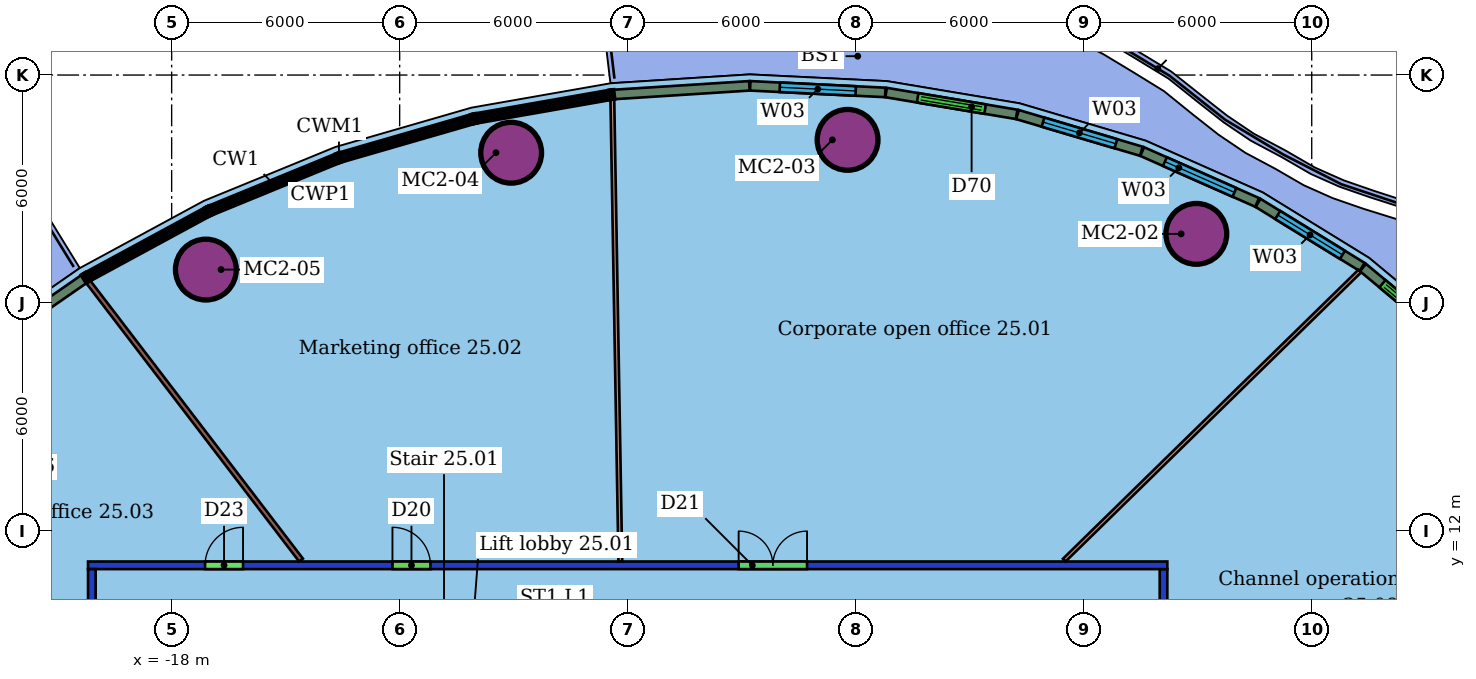
"""IFC4 building model, lengths in metres.
Left out: names, types, materials, properties, quantities, classifications, styles, units other than length and angle.
Written with IfcOpenShell. Run it as: python <this file> out.ifc"""

import sys

from ifc_helpers import new_model, si_unit, direction, frame, frame_2d, origin, origin_2d, place, context, subcontext, project, spatial, rectangle, hollow_circle, extrude, element, fill, save


model = new_model("IFC4")
c1 = context("Model", 3, precision=1e-05, world=origin(), true_north=direction((0.0, 1.0)))
c2 = subcontext(c1, "Body", "Model", "MODEL_VIEW")
j1 = project(units=[si_unit("LENGTHUNIT", "METRE"), si_unit("PLANEANGLEUNIT", "RADIAN")], contexts=[c1])
p1 = place(None, origin())
s1 = spatial("IfcSite", under=j1, at=p1, CompositionType="ELEMENT")
p2 = place(p1, origin())
s2 = spatial("IfcBuilding", under=s1, at=p2, CompositionType="ELEMENT")
p3 = place(p2, frame((0.0, 0.0, 110.2)))
s3 = spatial("IfcBuildingStorey", under=s2, at=p3, CompositionType="ELEMENT", Elevation=110.2)
for number, where, z_axis, x_axis in (
    (1, (8.963, 19.821, 0.0), (0.0, 0.0, 1.0), (1.0, 0.0, 0.0)),
    (2, (-0.213, 22.294, 0.0), (0.0, 0.0, 1.0), (1.0, 0.0, 0.0)),
    (3, (-9.066, 21.956, 0.0), (0.0, 0.0, 1.0), (1.0, 0.0, 0.0)),
    (4, (-17.1, 18.881, 0.0), (0.0, 0.0, 1.0), (1.0, 0.0, 0.0)),
):
    element("IfcColumn", number, at=place(p3, frame(where, z_axis=z_axis, x_axis=x_axis)), inside=s3, PredefinedType="COLUMN", context=c2, shape_type="SweptSolid", body=[
        extrude(hollow_circle(Radius=0.8, WallThickness=0.055, at=origin_2d()), origin(), (0.0, 0.0, 1.0), 3.45),
    ])
p4 = place(p3, frame((-20.1, -11.0, 0.0), z_axis=(0.0, 0.0, 1.0), x_axis=(0.0, 1.0, 0.0)))
e5 = element("IfcWall", 5, at=p4, inside=s3, PredefinedType="PARTITIONING", context=c2, shape_type="SweptSolid", body=[
    extrude(rectangle(XDim=22.0, YDim=0.2, at=frame_2d((11.0, 0.0))), origin(), (0.0, 0.0, 1.0), 3.0),
])
p5 = place(p4, frame((9.381, 0.0, 0.0)))
e6 = element("IfcOpeningElement", 6, at=p5, cuts=e5, PredefinedType="OPENING", context=c2, shape_type="SweptSolid", body=[
    extrude(rectangle(XDim=1.8, YDim=2.1, at=frame_2d((0.9, 1.05))), frame((0.0, 0.11, 0.0), z_axis=(0.0, -1.0, 0.0), x_axis=(1.0, 0.0, 0.0)), (0.0, 0.0, 1.0), 0.22),
])
p6 = place(p3, frame((-20.2, 11.1, 0.0), z_axis=(0.0, 0.0, 1.0), x_axis=(1.0, 0.0, 0.0)))
e7 = element("IfcWall", 7, at=p6, inside=s3, PredefinedType="PARTITIONING", context=c2, shape_type="SweptSolid", body=[
    extrude(rectangle(XDim=28.4, YDim=0.2, at=frame_2d((14.2, 0.0))), origin(), (0.0, 0.0, 1.0), 3.0),
])
p7 = place(p6, frame((17.12, 0.0, 0.0)))
e8 = element("IfcOpeningElement", 8, at=p7, cuts=e7, PredefinedType="OPENING", context=c2, shape_type="SweptSolid", body=[
    extrude(rectangle(XDim=1.8, YDim=2.1, at=frame_2d((0.9, 1.05))), frame((0.0, 0.11, 0.0), z_axis=(0.0, -1.0, 0.0), x_axis=(1.0, 0.0, 0.0)), (0.0, 0.0, 1.0), 0.22),
])
p8 = place(p6, frame((8.01, 0.0, 0.0)))
e9 = element("IfcOpeningElement", 9, at=p8, cuts=e7, PredefinedType="OPENING", context=c2, shape_type="SweptSolid", body=[
    extrude(rectangle(XDim=1.0, YDim=2.1, at=frame_2d((0.5, 1.05))), frame((0.0, 0.11, 0.0), z_axis=(0.0, -1.0, 0.0), x_axis=(1.0, 0.0, 0.0)), (0.0, 0.0, 1.0), 0.22),
])
p9 = place(p6, frame((3.078, 0.0, 0.0)))
e10 = element("IfcOpeningElement", 10, at=p9, cuts=e7, PredefinedType="OPENING", context=c2, shape_type="SweptSolid", body=[
    extrude(rectangle(XDim=1.0, YDim=2.4, at=frame_2d((0.5, 1.2))), frame((0.0, 0.11, 0.0), z_axis=(0.0, -1.0, 0.0), x_axis=(1.0, 0.0, 0.0)), (0.0, 0.0, 1.0), 0.22),
])
p10 = place(p3, frame((8.1, 11.0, 0.0), z_axis=(0.0, 0.0, 1.0), x_axis=(0.0, -1.0, 0.0)))
e11 = element("IfcWall", 11, at=p10, inside=s3, PredefinedType="PARTITIONING", context=c2, shape_type="SweptSolid", body=[
    extrude(rectangle(XDim=22.0, YDim=0.2, at=frame_2d((11.0, 0.0))), origin(), (0.0, 0.0, 1.0), 3.0),
])
p11 = place(p10, frame((10.526, 0.0, 0.0)))
e12 = element("IfcOpeningElement", 12, at=p11, cuts=e11, PredefinedType="OPENING", context=c2, shape_type="SweptSolid", body=[
    extrude(rectangle(XDim=1.8, YDim=2.1, at=frame_2d((0.9, 1.05))), frame((0.0, 0.11, 0.0), z_axis=(0.0, -1.0, 0.0), x_axis=(1.0, 0.0, 0.0)), (0.0, 0.0, 1.0), 0.22),
])
p12 = place(p10, frame((3.909, 0.0, 0.0)))
e13 = element("IfcOpeningElement", 13, at=p12, cuts=e11, PredefinedType="OPENING", context=c2, shape_type="SweptSolid", body=[
    extrude(rectangle(XDim=1.8, YDim=2.1, at=frame_2d((0.9, 1.05))), frame((0.0, 0.11, 0.0), z_axis=(0.0, -1.0, 0.0), x_axis=(1.0, 0.0, 0.0)), (0.0, 0.0, 1.0), 0.22),
])
p13 = place(p3, frame((13.265, 18.842, 0.0), z_axis=(0.0, 0.0, 1.0), x_axis=(-0.714906942323, -0.699219610579, 0.0)))
e14 = element("IfcWall", 14, at=p13, inside=s3, PredefinedType="PARTITIONING", context=c2, shape_type="SweptSolid", body=[
    extrude(rectangle(XDim=10.878, YDim=0.1, at=frame_2d((5.439, 0.0))), origin(), (0.0, 0.0, 1.0), 3.45),
])
p14 = place(p3, frame((-6.403, 23.361, 0.0), z_axis=(0.0, 0.0, 1.0), x_axis=(0.017264075927, -0.999850964735, 0.0)))
e15 = element("IfcWall", 15, at=p14, inside=s3, PredefinedType="PARTITIONING", context=c2, shape_type="SweptSolid", body=[
    extrude(rectangle(XDim=12.162, YDim=0.1, at=frame_2d((6.081, 0.0))), origin(), (0.0, 0.0, 1.0), 3.45),
])
p15 = place(p3, frame((-20.195, 18.558, 0.0), z_axis=(0.0, 0.0, 1.0), x_axis=(0.607534665721, -0.79429316373, 0.0)))
e16 = element("IfcWall", 16, at=p15, inside=s3, PredefinedType="PARTITIONING", context=c2, shape_type="SweptSolid", body=[
    extrude(rectangle(XDim=9.216, YDim=0.125, at=frame_2d((4.608, 0.0))), origin(), (0.0, 0.0, 1.0), 3.45),
])
p16 = place(p3, frame((-28.197, 11.553, 0.0), z_axis=(0.0, 0.0, 1.0), x_axis=(0.887035614959, -0.461701004759, 0.0)))
e17 = element("IfcWall", 17, at=p16, inside=s3, PredefinedType="PARTITIONING", context=c2, shape_type="SweptSolid", body=[
    extrude(rectangle(XDim=8.982, YDim=0.125, at=frame_2d((4.491, 0.0))), origin(), (0.0, 0.0, 1.0), 3.45),
])
p17 = place(p3, frame((15.758, 16.93, 0.0), z_axis=(0.0, 0.0, 1.0), x_axis=(-0.768712564722, 0.639594397129, 0.0)))
e18 = element("IfcWall", 18, at=p17, inside=s3, PredefinedType="SOLIDWALL", context=c2, shape_type="SweptSolid", body=[
    extrude(rectangle(XDim=3.135, YDim=0.25, at=frame_2d((1.567, 0.0))), origin(), (0.0, 0.0, 1.0), 3.05),
])
p18 = place(p17, frame((0.667, 0.0, 0.0)))
e19 = element("IfcOpeningElement", 19, at=p18, cuts=e18, PredefinedType="OPENING", context=c2, shape_type="SweptSolid", body=[
    extrude(rectangle(XDim=1.8, YDim=2.4, at=frame_2d((0.9, 1.2))), frame((0.0, 0.135, 0.0), z_axis=(0.0, -1.0, 0.0), x_axis=(1.0, 0.0, 0.0)), (0.0, 0.0, 1.0), 0.27),
])
p19 = place(p3, frame((13.327, 18.951, 0.0), z_axis=(0.0, 0.0, 1.0), x_axis=(-0.851681761788, 0.524059325494, 0.0)))
e20 = element("IfcWall", 20, at=p19, inside=s3, PredefinedType="SOLIDWALL", context=c2, shape_type="SweptSolid", body=[
    extrude(rectangle(XDim=3.218, YDim=0.25, at=frame_2d((1.609, 0.0))), origin(), (0.0, 0.0, 1.0), 3.05),
])
p20 = place(p19, frame((0.609, 0.0, 0.9)))
e21 = element("IfcOpeningElement", 21, at=p20, cuts=e20, PredefinedType="OPENING", context=c2, shape_type="SweptSolid", body=[
    extrude(rectangle(XDim=2.0, YDim=2.1, at=frame_2d((1.0, 1.05))), frame((0.0, 0.135, 0.0), z_axis=(0.0, -1.0, 0.0), x_axis=(1.0, 0.0, 0.0)), (0.0, 0.0, 1.0), 0.27),
])
p21 = place(p3, frame((10.564, 20.648, 0.0), z_axis=(0.0, 0.0, 1.0), x_axis=(-0.91455266452, 0.404466838961, 0.0)))
e22 = element("IfcWall", 22, at=p21, inside=s3, PredefinedType="SOLIDWALL", context=c2, shape_type="SweptSolid", body=[
    extrude(rectangle(XDim=3.308, YDim=0.25, at=frame_2d((1.654, 0.0))), origin(), (0.0, 0.0, 1.0), 3.05),
])
p22 = place(p21, frame((0.654, 0.0, 0.9)))
e23 = element("IfcOpeningElement", 23, at=p22, cuts=e22, PredefinedType="OPENING", context=c2, shape_type="SweptSolid", body=[
    extrude(rectangle(XDim=2.0, YDim=2.1, at=frame_2d((1.0, 1.05))), frame((0.0, 0.135, 0.0), z_axis=(0.0, -1.0, 0.0), x_axis=(1.0, 0.0, 0.0)), (0.0, 0.0, 1.0), 0.27),
])
p23 = place(p3, frame((7.517, 21.995, 0.0), z_axis=(0.0, 0.0, 1.0), x_axis=(-0.958824925222, 0.283997821775, 0.0)))
e24 = element("IfcWall", 24, at=p23, inside=s3, PredefinedType="SOLIDWALL", context=c2, shape_type="SweptSolid", body=[
    extrude(rectangle(XDim=3.398, YDim=0.25, at=frame_2d((1.699, 0.0))), origin(), (0.0, 0.0, 1.0), 3.05),
])
p24 = place(p23, frame((0.699, 0.0, 0.9)))
e25 = element("IfcOpeningElement", 25, at=p24, cuts=e24, PredefinedType="OPENING", context=c2, shape_type="SweptSolid", body=[
    extrude(rectangle(XDim=2.0, YDim=2.1, at=frame_2d((1.0, 1.05))), frame((0.0, 0.135, 0.0), z_axis=(0.0, -1.0, 0.0), x_axis=(1.0, 0.0, 0.0)), (0.0, 0.0, 1.0), 0.27),
])
p25 = place(p3, frame((4.236, 22.965, 0.0), z_axis=(0.0, 0.0, 1.0), x_axis=(-0.986281925568, 0.165069571083, 0.0)))
e26 = element("IfcWall", 26, at=p25, inside=s3, PredefinedType="SOLIDWALL", context=c2, shape_type="SweptSolid", body=[
    extrude(rectangle(XDim=3.483, YDim=0.25, at=frame_2d((1.742, 0.0))), origin(), (0.0, 0.0, 1.0), 3.05),
])
p26 = place(p25, frame((0.842, 0.0, 0.0)))
e27 = element("IfcOpeningElement", 27, at=p26, cuts=e26, PredefinedType="OPENING", context=c2, shape_type="SweptSolid", body=[
    extrude(rectangle(XDim=1.8, YDim=2.4, at=frame_2d((0.9, 1.2))), frame((0.0, 0.135, 0.0), z_axis=(0.0, -1.0, 0.0), x_axis=(1.0, 0.0, 0.0)), (0.0, 0.0, 1.0), 0.27),
])
p27 = place(p3, frame((0.778, 23.542, 0.0), z_axis=(0.0, 0.0, 1.0), x_axis=(-0.998802311513, 0.048927931852, 0.0)))
e28 = element("IfcWall", 28, at=p27, inside=s3, PredefinedType="SOLIDWALL", context=c2, shape_type="SweptSolid", body=[
    extrude(rectangle(XDim=3.558, YDim=0.25, at=frame_2d((1.779, 0.0))), origin(), (0.0, 0.0, 1.0), 3.05),
])
p28 = place(p27, frame((0.779, 0.0, 0.9)))
e29 = element("IfcOpeningElement", 29, at=p28, cuts=e28, PredefinedType="OPENING", context=c2, shape_type="SweptSolid", body=[
    extrude(rectangle(XDim=2.0, YDim=2.1, at=frame_2d((1.0, 1.05))), frame((0.0, 0.135, 0.0), z_axis=(0.0, -1.0, 0.0), x_axis=(1.0, 0.0, 0.0)), (0.0, 0.0, 1.0), 0.27),
])
p29 = place(p3, frame((-2.797, 23.716, 0.0), z_axis=(0.0, 0.0, 1.0), x_axis=(-0.997966032013, -0.063747932895, 0.0)))
e30 = element("IfcWall", 30, at=p29, inside=s3, PredefinedType="SOLIDWALL", context=c2, shape_type="SweptSolid", body=[
    extrude(rectangle(XDim=3.573, YDim=0.25, at=frame_2d((1.787, 0.0))), origin(), (0.0, 0.0, 1.0), 3.05),
])
p30 = place(p3, frame((-20.305, 18.633, 0.0), z_axis=(0.0, 0.0, 1.0), x_axis=(-0.821702391874, -0.56991681778, 0.0)))
e31 = element("IfcWall", 31, at=p30, inside=s3, PredefinedType="SOLIDWALL", context=c2, shape_type="SweptSolid", body=[
    extrude(rectangle(XDim=3.573, YDim=0.25, at=frame_2d((1.787, 0.0))), origin(), (0.0, 0.0, 1.0), 3.05),
])
p31 = place(p7, origin())
e32 = element("IfcDoor", 32, at=p31, inside=s3, OperationType="DOUBLE_DOOR_SINGLE_SWING", PredefinedType="DOOR", context=c2, shape_type="SweptSolid", body=[
    extrude(rectangle(XDim=1.8, YDim=2.1, at=frame_2d((0.9, 1.05))), frame((0.0, 0.025, 0.0), z_axis=(0.0, -1.0, 0.0), x_axis=(1.0, 0.0, 0.0)), (0.0, 0.0, 1.0), 0.05),
])
fill(e8, e32)
p32 = place(p8, origin())
e33 = element("IfcDoor", 33, at=p32, inside=s3, OperationType="SINGLE_SWING_LEFT", PredefinedType="DOOR", context=c2, shape_type="SweptSolid", body=[
    extrude(rectangle(XDim=1.0, YDim=2.1, at=frame_2d((0.5, 1.05))), frame((0.0, 0.025, 0.0), z_axis=(0.0, -1.0, 0.0), x_axis=(1.0, 0.0, 0.0)), (0.0, 0.0, 1.0), 0.05),
])
fill(e9, e33)
p33 = place(p9, origin())
e34 = element("IfcDoor", 34, at=p33, inside=s3, OperationType="SINGLE_SWING_RIGHT", PredefinedType="DOOR", context=c2, shape_type="SweptSolid", body=[
    extrude(rectangle(XDim=1.0, YDim=2.4, at=frame_2d((0.5, 1.2))), frame((0.0, 0.025, 0.0), z_axis=(0.0, -1.0, 0.0), x_axis=(1.0, 0.0, 0.0)), (0.0, 0.0, 1.0), 0.05),
])
fill(e10, e34)
p34 = place(p18, origin())
e35 = element("IfcDoor", 35, at=p34, inside=s3, OperationType="DOUBLE_DOOR_SLIDING", PredefinedType="DOOR", context=c2, shape_type="SweptSolid", body=[
    extrude(rectangle(XDim=1.8, YDim=2.4, at=frame_2d((0.9, 1.2))), frame((0.0, 0.025, 0.0), z_axis=(0.0, -1.0, 0.0), x_axis=(1.0, 0.0, 0.0)), (0.0, 0.0, 1.0), 0.05),
])
fill(e19, e35)
p35 = place(p20, origin())
e36 = element("IfcWindow", 36, at=p35, inside=s3, PartitioningType="SINGLE_PANEL", PredefinedType="WINDOW", context=c2, shape_type="SweptSolid", body=[
    extrude(rectangle(XDim=2.0, YDim=2.1, at=frame_2d((1.0, 1.05))), frame((0.0, 0.03, 0.0), z_axis=(0.0, -1.0, 0.0), x_axis=(1.0, 0.0, 0.0)), (0.0, 0.0, 1.0), 0.06),
])
fill(e21, e36)
p36 = place(p22, origin())
e37 = element("IfcWindow", 37, at=p36, inside=s3, PartitioningType="SINGLE_PANEL", PredefinedType="WINDOW", context=c2, shape_type="SweptSolid", body=[
    extrude(rectangle(XDim=2.0, YDim=2.1, at=frame_2d((1.0, 1.05))), frame((0.0, 0.03, 0.0), z_axis=(0.0, -1.0, 0.0), x_axis=(1.0, 0.0, 0.0)), (0.0, 0.0, 1.0), 0.06),
])
fill(e23, e37)
p37 = place(p24, origin())
e38 = element("IfcWindow", 38, at=p37, inside=s3, PartitioningType="SINGLE_PANEL", PredefinedType="WINDOW", context=c2, shape_type="SweptSolid", body=[
    extrude(rectangle(XDim=2.0, YDim=2.1, at=frame_2d((1.0, 1.05))), frame((0.0, 0.03, 0.0), z_axis=(0.0, -1.0, 0.0), x_axis=(1.0, 0.0, 0.0)), (0.0, 0.0, 1.0), 0.06),
])
fill(e25, e38)
p38 = place(p26, origin())
e39 = element("IfcDoor", 39, at=p38, inside=s3, OperationType="DOUBLE_DOOR_SLIDING", PredefinedType="DOOR", context=c2, shape_type="SweptSolid", body=[
    extrude(rectangle(XDim=1.8, YDim=2.4, at=frame_2d((0.9, 1.2))), frame((0.0, 0.025, 0.0), z_axis=(0.0, -1.0, 0.0), x_axis=(1.0, 0.0, 0.0)), (0.0, 0.0, 1.0), 0.05),
])
fill(e27, e39)
p39 = place(p28, origin())
e40 = element("IfcWindow", 40, at=p39, inside=s3, PartitioningType="SINGLE_PANEL", PredefinedType="WINDOW", context=c2, shape_type="SweptSolid", body=[
    extrude(rectangle(XDim=2.0, YDim=2.1, at=frame_2d((1.0, 1.05))), frame((0.0, 0.03, 0.0), z_axis=(0.0, -1.0, 0.0), x_axis=(1.0, 0.0, 0.0)), (0.0, 0.0, 1.0), 0.06),
])
fill(e29, e40)
save(model, sys.argv[1])
